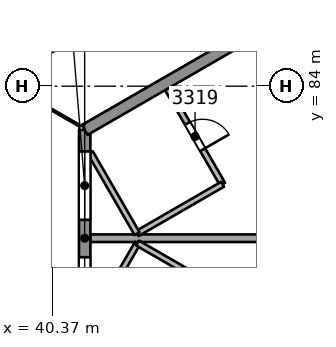
"""IFC4 building model, lengths in metres.
Left out: names, types, materials, properties, quantities, classifications, styles, units other than length and angle.
Written with IfcOpenShell. Run it as: python <this file> out.ifc"""

import sys

from ifc_helpers import new_model, si_unit, direction, frame, frame_2d, origin, place, context, subcontext, project, spatial, rectangle, extrude, element, fill, save


model = new_model("IFC4")
c1 = context("Model", 3, precision=1e-05, world=origin(), true_north=direction((0.0, 1.0)))
c2 = subcontext(c1, "Body", "Model", "MODEL_VIEW")
j1 = project(units=[si_unit("LENGTHUNIT", "METRE"), si_unit("PLANEANGLEUNIT", "RADIAN")], contexts=[c1])
p1 = place(None, origin())
s1 = spatial("IfcSite", under=j1, at=p1, CompositionType="ELEMENT")
p2 = place(p1, origin())
s2 = spatial("IfcBuilding", under=s1, at=p2, CompositionType="ELEMENT")
p3 = place(p2, frame((0.0, 0.0, 136.4)))
s3 = spatial("IfcBuildingStorey", under=s2, at=p3, CompositionType="ELEMENT", Elevation=136.4)
p4 = place(p3, frame((43.407, 83.932, 0.0), z_axis=(0.0, 0.0, 1.0), x_axis=(0.499987231761, -0.866032775405, 0.0)))
e1 = element("IfcWall", 1, at=p4, inside=s3, PredefinedType="PARTITIONING", context=c2, shape_type="SweptSolid", body=[
    extrude(rectangle(XDim=2.9, YDim=0.15, at=frame_2d((1.45, 0.0))), origin(), (0.0, 0.0, 1.0), 3.25),
])
p5 = place(p4, frame((1.05, 0.0, 0.0)))
e2 = element("IfcOpeningElement", 2, at=p5, cuts=e1, PredefinedType="OPENING", context=c2, shape_type="SweptSolid", body=[
    extrude(rectangle(XDim=0.8, YDim=2.1, at=frame_2d((0.4, 1.05))), frame((0.0, 0.085, 0.0), z_axis=(0.0, -1.0, 0.0), x_axis=(1.0, 0.0, 0.0)), (0.0, 0.0, 1.0), 0.171),
])
p6 = place(p3, frame((44.857, 81.42, 0.0), z_axis=(0.0, 0.0, 1.0), x_axis=(-0.866021400173, -0.500006934395, 0.0)))
e3 = element("IfcWall", 3, at=p6, inside=s3, PredefinedType="PARTITIONING", context=c2, shape_type="SweptSolid", body=[
    extrude(rectangle(XDim=2.6, YDim=0.15, at=frame_2d((1.3, 0.0))), origin(), (0.0, 0.0, 1.0), 3.25),
])
p7 = place(p3, frame((42.605, 80.12, 0.0), z_axis=(0.0, 0.0, 1.0), x_axis=(-0.499994660107, 0.866028486751, 0.0)))
e4 = element("IfcWall", 4, at=p7, inside=s3, PredefinedType="PARTITIONING", context=c2, shape_type="SweptSolid", body=[
    extrude(rectangle(XDim=2.458, YDim=0.15, at=frame_2d((1.229, 0.0))), origin(), (0.0, 0.0, 1.0), 3.25),
])
p8 = place(p3, frame((41.376, 80.0, 0.0), z_axis=(0.0, 0.0, 1.0), x_axis=(1.0, 0.0, 0.0)))
e5 = element("IfcWall", 5, at=p8, inside=s3, PredefinedType="PARTITIONING", context=c2, shape_type="SweptSolid", body=[
    extrude(rectangle(XDim=6.822, YDim=0.2, at=frame_2d((3.411, 0.0))), origin(), (0.0, 0.0, 1.0), 3.25),
])
p9 = place(p3, frame((41.376, 77.718, 0.0), z_axis=(0.0, 0.0, 1.0), x_axis=(0.500014231302, 0.866017187182, 0.0)))
e6 = element("IfcWall", 6, at=p9, inside=s3, PredefinedType="PARTITIONING", context=c2, shape_type="SweptSolid", body=[
    extrude(rectangle(XDim=2.487, YDim=0.15, at=frame_2d((1.243, 0.0))), origin(), (0.0, 0.0, 1.0), 3.25),
])
p10 = place(p3, frame((42.62, 79.871, 0.0), z_axis=(0.0, 0.0, 1.0), x_axis=(0.866062058628, -0.499936506574, 0.0)))
e7 = element("IfcWall", 7, at=p10, inside=s3, PredefinedType="PARTITIONING", context=c2, shape_type="SweptSolid", body=[
    extrude(rectangle(XDim=2.6, YDim=0.15, at=frame_2d((1.3, 0.0))), origin(), (0.0, 0.0, 1.0), 3.25),
])
p11 = place(p3, frame((41.227, 77.153, 0.0), z_axis=(0.0, 0.0, 1.0), x_axis=(0.0, 1.0, 0.0)))
e8 = element("IfcWall", 8, at=p11, inside=s3, PredefinedType="SOLIDWALL", context=c2, shape_type="SweptSolid", body=[
    extrude(rectangle(XDim=5.694, YDim=0.3, at=frame_2d((2.847, 0.0))), origin(), (0.0, 0.0, 1.0), 3.25),
])
p12 = place(p11, frame((3.331, 0.0, 0.9)))
e9 = element("IfcOpeningElement", 9, at=p12, cuts=e8, PredefinedType="OPENING", context=c2, shape_type="SweptSolid", body=[
    extrude(rectangle(XDim=1.8, YDim=1.5, at=frame_2d((0.9, 0.75))), frame((0.0, 0.161, 0.0), z_axis=(0.0, -1.0, 0.0), x_axis=(1.0, 0.0, 0.0)), (0.0, 0.0, 1.0), 0.321),
])
p13 = place(p11, frame((0.546, 0.0, 0.9)))
e10 = element("IfcOpeningElement", 10, at=p13, cuts=e8, PredefinedType="OPENING", context=c2, shape_type="SweptSolid", body=[
    extrude(rectangle(XDim=1.8, YDim=1.5, at=frame_2d((0.9, 0.75))), frame((0.0, 0.161, 0.0), z_axis=(0.0, -1.0, 0.0), x_axis=(1.0, 0.0, 0.0)), (0.0, 0.0, 1.0), 0.321),
])
p14 = place(p3, frame((41.227, 82.847, 0.0), z_axis=(0.0, 0.0, 1.0), x_axis=(0.866024492862, 0.50000157776, 0.0)))
e11 = element("IfcWall", 11, at=p14, inside=s3, PredefinedType="SOLIDWALL", context=c2, shape_type="SweptSolid", body=[
    extrude(rectangle(XDim=55.649, YDim=0.3, at=frame_2d((27.825, 0.0))), origin(), (0.0, 0.0, 1.0), 3.25),
])
p15 = place(p14, frame((26.781, 0.0, 0.0)))
e12 = element("IfcOpeningElement", 12, at=p15, cuts=e11, PredefinedType="OPENING", context=c2, shape_type="SweptSolid", body=[
    extrude(rectangle(XDim=2.4, YDim=2.4, at=frame_2d((1.2, 1.2))), frame((0.0, 0.161, 0.0), z_axis=(0.0, -1.0, 0.0), x_axis=(1.0, 0.0, 0.0)), (0.0, 0.0, 1.0), 0.321),
])
p16 = place(p14, frame((32.081, 0.0, 0.0)))
e13 = element("IfcOpeningElement", 13, at=p16, cuts=e11, PredefinedType="OPENING", context=c2, shape_type="SweptSolid", body=[
    extrude(rectangle(XDim=2.4, YDim=2.4, at=frame_2d((1.2, 1.2))), frame((0.0, 0.161, 0.0), z_axis=(0.0, -1.0, 0.0), x_axis=(1.0, 0.0, 0.0)), (0.0, 0.0, 1.0), 0.321),
])
p17 = place(p14, frame((43.22, 0.0, 0.0)))
e14 = element("IfcOpeningElement", 14, at=p17, cuts=e11, PredefinedType="OPENING", context=c2, shape_type="SweptSolid", body=[
    extrude(rectangle(XDim=2.4, YDim=2.4, at=frame_2d((1.2, 1.2))), frame((0.0, 0.161, 0.0), z_axis=(0.0, -1.0, 0.0), x_axis=(1.0, 0.0, 0.0)), (0.0, 0.0, 1.0), 0.321),
])
p18 = place(p14, frame((21.324, 0.0, 0.0)))
e15 = element("IfcOpeningElement", 15, at=p18, cuts=e11, PredefinedType="OPENING", context=c2, shape_type="SweptSolid", body=[
    extrude(rectangle(XDim=2.4, YDim=2.4, at=frame_2d((1.2, 1.2))), frame((0.0, 0.161, 0.0), z_axis=(0.0, -1.0, 0.0), x_axis=(1.0, 0.0, 0.0)), (0.0, 0.0, 1.0), 0.321),
])
p19 = place(p14, frame((10.021, 0.0, 0.0)))
e16 = element("IfcOpeningElement", 16, at=p19, cuts=e11, PredefinedType="OPENING", context=c2, shape_type="SweptSolid", body=[
    extrude(rectangle(XDim=2.4, YDim=2.4, at=frame_2d((1.2, 1.2))), frame((0.0, 0.161, 0.0), z_axis=(0.0, -1.0, 0.0), x_axis=(1.0, 0.0, 0.0)), (0.0, 0.0, 1.0), 0.321),
])
p20 = place(p5, origin())
e17 = element("IfcDoor", 17, at=p20, inside=s3, OperationType="SINGLE_SWING_RIGHT", PredefinedType="NOTDEFINED", context=c2, shape_type="SweptSolid", body=[
    extrude(rectangle(XDim=0.8, YDim=2.1, at=frame_2d((0.4, 1.05))), frame((0.0, 0.025, 0.0), z_axis=(0.0, -1.0, 0.0), x_axis=(1.0, 0.0, 0.0)), (0.0, 0.0, 1.0), 0.05),
])
fill(e2, e17)
p21 = place(p12, origin())
e18 = element("IfcWindow", 18, at=p21, inside=s3, PartitioningType="SINGLE_PANEL", PredefinedType="WINDOW", context=c2, shape_type="SweptSolid", body=[
    extrude(rectangle(XDim=1.8, YDim=1.5, at=frame_2d((0.9, 0.75))), frame((0.0, 0.03, 0.0), z_axis=(0.0, -1.0, 0.0), x_axis=(1.0, 0.0, 0.0)), (0.0, 0.0, 1.0), 0.06),
])
fill(e9, e18)
p22 = place(p13, origin())
e19 = element("IfcWindow", 19, at=p22, inside=s3, PartitioningType="SINGLE_PANEL", PredefinedType="WINDOW", context=c2, shape_type="SweptSolid", body=[
    extrude(rectangle(XDim=1.8, YDim=1.5, at=frame_2d((0.9, 0.75))), frame((0.0, 0.03, 0.0), z_axis=(0.0, -1.0, 0.0), x_axis=(1.0, 0.0, 0.0)), (0.0, 0.0, 1.0), 0.06),
])
fill(e10, e19)
save(model, sys.argv[1])
